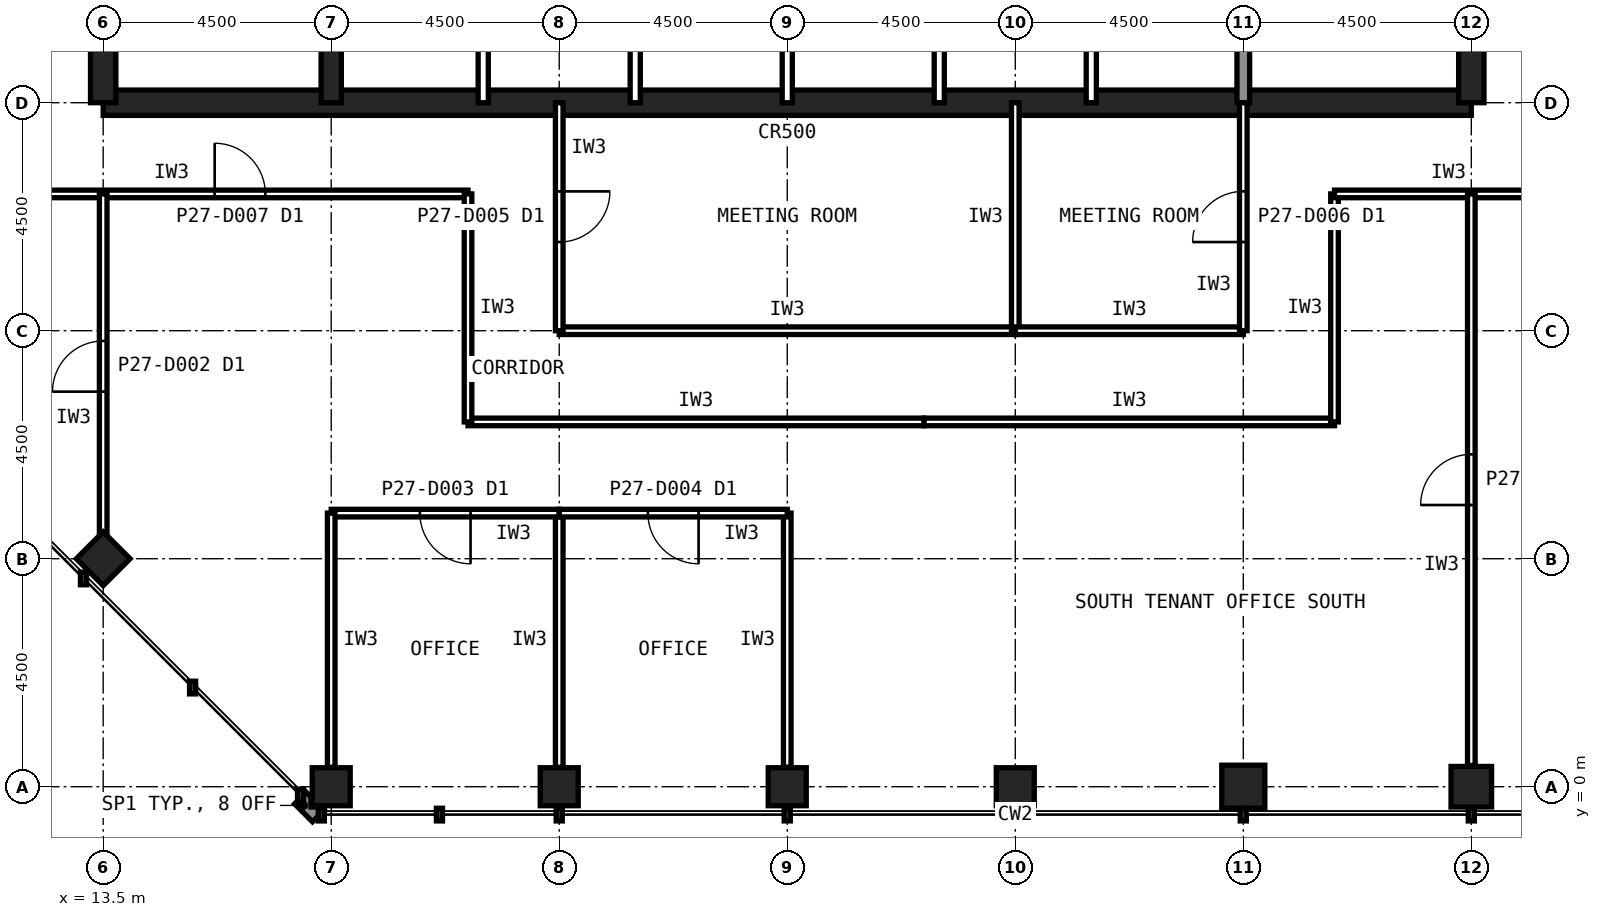
"""IFC4 building model, lengths in metres.
Left out: names, types, materials, properties, quantities, classifications, styles, units other than length and angle.
Written with IfcOpenShell. Run it as: python <this file> out.ifc"""

import sys

from ifc_helpers import new_model, si_unit, direction, frame, frame_2d, origin, origin_2d, place, context, subcontext, project, spatial, rectangle, hollow_rectangle, extrude, element, fill, save


model = new_model("IFC4")
c1 = context("Model", 3, precision=1e-05, world=origin(), true_north=direction((0.0, 1.0)))
c2 = subcontext(c1, "Body", "Model", "MODEL_VIEW")
j1 = project(units=[si_unit("LENGTHUNIT", "METRE"), si_unit("PLANEANGLEUNIT", "RADIAN")], contexts=[c1])
p1 = place(None, origin())
s1 = spatial("IfcSite", under=j1, at=p1, CompositionType="ELEMENT")
p2 = place(p1, origin())
s2 = spatial("IfcBuilding", under=s1, at=p2, CompositionType="ELEMENT")
p3 = place(p2, frame((0.0, 0.0, 119.6)))
s3 = spatial("IfcBuildingStorey", under=s2, at=p3, CompositionType="ELEMENT", Elevation=119.6)
for number, where, z_axis, x_axis in (
    (1, (18.0, 0.0, 0.0), (0.0, 0.0, 1.0), (1.0, 0.0, 0.0)),
    (2, (22.5, 0.0, 0.0), (0.0, 0.0, 1.0), (1.0, 0.0, 0.0)),
    (3, (27.0, 0.0, 0.0), (0.0, 0.0, 1.0), (1.0, 0.0, 0.0)),
    (4, (31.5, 0.0, 0.0), (0.0, 0.0, 1.0), (1.0, 0.0, 0.0)),
):
    element("IfcColumn", number, at=place(p3, frame(where, z_axis=z_axis, x_axis=x_axis)), inside=s3, PredefinedType="COLUMN", context=c2, shape_type="SweptSolid", body=[
        extrude(hollow_rectangle(XDim=0.75, YDim=0.75, WallThickness=0.04, at=origin_2d()), origin(), (0.0, 0.0, 1.0), 4.0),
    ])
p4 = place(p3, frame((36.0, 0.0, 0.0), z_axis=(0.0, 0.0, 1.0), x_axis=(1.0, 0.0, 0.0)))
e5 = element("IfcColumn", 5, at=p4, inside=s3, PredefinedType="COLUMN", context=c2, shape_type="SweptSolid", body=[
    extrude(hollow_rectangle(XDim=0.85, YDim=0.85, WallThickness=0.05, at=origin_2d()), origin(), (0.0, 0.0, 1.0), 4.0),
])
p5 = place(p3, frame((40.5, 0.0, 0.0), z_axis=(0.0, 0.0, 1.0), x_axis=(1.0, 0.0, 0.0)))
e6 = element("IfcColumn", 6, at=p5, inside=s3, PredefinedType="COLUMN", context=c2, shape_type="SweptSolid", body=[
    extrude(hollow_rectangle(XDim=0.8, YDim=0.8, WallThickness=0.045, at=origin_2d()), origin(), (0.0, 0.0, 1.0), 4.0),
])
p6 = place(p3, frame((13.5, 4.5, 0.0), z_axis=(0.0, 0.0, 1.0), x_axis=(0.707106781187, 0.707106781187, 0.0)))
e7 = element("IfcColumn", 7, at=p6, inside=s3, PredefinedType="COLUMN", context=c2, shape_type="SweptSolid", body=[
    extrude(hollow_rectangle(XDim=0.75, YDim=0.75, WallThickness=0.04, at=origin_2d()), origin(), (0.0, 0.0, 1.0), 4.0),
])
p7 = place(p3, frame((13.5, 13.5, 0.0), z_axis=(0.0, 0.0, 1.0), x_axis=(1.0, 0.0, 0.0)))
e8 = element("IfcWall", 8, at=p7, inside=s3, PredefinedType="SHEAR", context=c2, shape_type="SweptSolid", body=[
    extrude(rectangle(XDim=27.0, YDim=0.5, at=frame_2d((13.5, 0.0))), origin(), (0.0, 0.0, 1.0), 4.0),
])
p8 = place(p3, frame((40.5, 13.5, 0.0), z_axis=(0.0, 0.0, 1.0), x_axis=(0.0, 1.0, 0.0)))
e9 = element("IfcWall", 9, at=p8, inside=s3, PredefinedType="SHEAR", context=c2, shape_type="SweptSolid", body=[
    extrude(rectangle(XDim=27.0, YDim=0.5, at=frame_2d((13.5, 0.0))), origin(), (0.0, 0.0, 1.0), 4.0),
])
p9 = place(p8, frame((5.85, 0.0, 0.0)))
e10 = element("IfcOpeningElement", 10, at=p9, cuts=e9, PredefinedType="OPENING", context=c2, shape_type="SweptSolid", body=[
    extrude(rectangle(XDim=1.8, YDim=2.1, at=frame_2d((0.9, 1.05))), frame((0.0, 0.26, 0.0), z_axis=(0.0, -1.0, 0.0), x_axis=(1.0, 0.0, 0.0)), (0.0, 0.0, 1.0), 0.52),
])
p10 = place(p8, frame((19.65, 0.0, 0.0)))
e11 = element("IfcOpeningElement", 11, at=p10, cuts=e9, PredefinedType="OPENING", context=c2, shape_type="SweptSolid", body=[
    extrude(rectangle(XDim=1.2, YDim=2.1, at=frame_2d((0.6, 1.05))), frame((0.0, 0.26, 0.0), z_axis=(0.0, -1.0, 0.0), x_axis=(1.0, 0.0, 0.0)), (0.0, 0.0, 1.0), 0.52),
])
p11 = place(p3, frame((13.5, 40.5, 0.0), z_axis=(0.0, 0.0, 1.0), x_axis=(0.0, -1.0, 0.0)))
e12 = element("IfcWall", 12, at=p11, inside=s3, PredefinedType="SHEAR", context=c2, shape_type="SweptSolid", body=[
    extrude(rectangle(XDim=27.0, YDim=0.5, at=frame_2d((13.5, 0.0))), origin(), (0.0, 0.0, 1.0), 4.0),
])
p12 = place(p11, frame((19.65, 0.0, 0.0)))
e13 = element("IfcOpeningElement", 13, at=p12, cuts=e12, PredefinedType="OPENING", context=c2, shape_type="SweptSolid", body=[
    extrude(rectangle(XDim=1.2, YDim=2.1, at=frame_2d((0.6, 1.05))), frame((0.0, 0.26, 0.0), z_axis=(0.0, -1.0, 0.0), x_axis=(1.0, 0.0, 0.0)), (0.0, 0.0, 1.0), 0.52),
])
p13 = place(p11, frame((5.85, 0.0, 0.0)))
e14 = element("IfcOpeningElement", 14, at=p13, cuts=e12, PredefinedType="OPENING", context=c2, shape_type="SweptSolid", body=[
    extrude(rectangle(XDim=1.8, YDim=2.1, at=frame_2d((0.9, 1.05))), frame((0.0, 0.26, 0.0), z_axis=(0.0, -1.0, 0.0), x_axis=(1.0, 0.0, 0.0)), (0.0, 0.0, 1.0), 0.52),
])
p14 = place(p3, frame((18.0, 13.5, 0.0), z_axis=(0.0, 0.0, 1.0), x_axis=(0.0, 1.0, 0.0)))
e15 = element("IfcWall", 15, at=p14, inside=s3, PredefinedType="SHEAR", context=c2, shape_type="SweptSolid", body=[
    extrude(rectangle(XDim=18.0, YDim=0.4, at=frame_2d((9.0, 0.0))), origin(), (0.0, 0.0, 1.0), 4.0),
])
p15 = place(p3, frame((36.0, 13.5, 0.0), z_axis=(0.0, 0.0, 1.0), x_axis=(0.0, 1.0, 0.0)))
e16 = element("IfcWall", 16, at=p15, inside=s3, PredefinedType="SOLIDWALL", context=c2, shape_type="SweptSolid", body=[
    extrude(rectangle(XDim=4.5, YDim=0.25, at=frame_2d((2.25, 0.0))), origin(), (0.0, 0.0, 1.0), 3.84),
])
for number, where, z_axis, x_axis in (
    (17, (21.0, 13.5, 0.0), (0.0, 0.0, 1.0), (0.0, 1.0, 0.0)),
    (18, (24.0, 13.5, 0.0), (0.0, 0.0, 1.0), (0.0, 1.0, 0.0)),
    (19, (27.0, 13.5, 0.0), (0.0, 0.0, 1.0), (0.0, 1.0, 0.0)),
    (20, (30.0, 13.5, 0.0), (0.0, 0.0, 1.0), (0.0, 1.0, 0.0)),
    (21, (33.0, 13.5, 0.0), (0.0, 0.0, 1.0), (0.0, 1.0, 0.0)),
):
    element("IfcWall", number, at=place(p3, frame(where, z_axis=z_axis, x_axis=x_axis)), inside=s3, PredefinedType="PARTITIONING", context=c2, shape_type="SweptSolid", body=[
        extrude(rectangle(XDim=4.5, YDim=0.2, at=frame_2d((2.25, 0.0))), origin(), (0.0, 0.0, 1.0), 3.84),
    ])
p16 = place(p3, frame((11.7, 11.7, 0.0), z_axis=(0.0, 0.0, 1.0), x_axis=(1.0, 0.0, 0.0)))
e22 = element("IfcWall", 22, at=p16, inside=s3, PredefinedType="PARTITIONING", context=c2, shape_type="SweptSolid", body=[
    extrude(rectangle(XDim=9.0, YDim=0.15, at=frame_2d((4.5, 0.0))), origin(), (0.0, 0.0, 1.0), 3.84),
])
p17 = place(p16, frame((4.0, 0.0, 0.0)))
e23 = element("IfcOpeningElement", 23, at=p17, cuts=e22, PredefinedType="OPENING", context=c2, shape_type="SweptSolid", body=[
    extrude(rectangle(XDim=1.0, YDim=2.1, at=frame_2d((0.5, 1.05))), frame((0.0, 0.085, 0.0), z_axis=(0.0, -1.0, 0.0), x_axis=(1.0, 0.0, 0.0)), (0.0, 0.0, 1.0), 0.17),
])
p18 = place(p3, frame((20.7, 7.2, 0.0), z_axis=(0.0, 0.0, 1.0), x_axis=(1.0, 0.0, 0.0)))
e24 = element("IfcWall", 24, at=p18, inside=s3, PredefinedType="PARTITIONING", context=c2, shape_type="SweptSolid", body=[
    extrude(rectangle(XDim=9.0, YDim=0.15, at=frame_2d((4.5, 0.0))), origin(), (0.0, 0.0, 1.0), 3.84),
])
p19 = place(p3, frame((29.7, 7.2, 0.0), z_axis=(0.0, 0.0, 1.0), x_axis=(1.0, 0.0, 0.0)))
e25 = element("IfcWall", 25, at=p19, inside=s3, PredefinedType="PARTITIONING", context=c2, shape_type="SweptSolid", body=[
    extrude(rectangle(XDim=8.1, YDim=0.15, at=frame_2d((4.05, 0.0))), origin(), (0.0, 0.0, 1.0), 3.84),
])
for number, where, z_axis, x_axis in (
    (26, (20.7, 11.7, 0.0), (0.0, 0.0, 1.0), (0.0, -1.0, 0.0)),
    (27, (37.8, 7.2, 0.0), (0.0, 0.0, 1.0), (0.0, 1.0, 0.0)),
    (28, (37.8, 11.7, 0.0), (0.0, 0.0, 1.0), (1.0, 0.0, 0.0)),
):
    element("IfcWall", number, at=place(p3, frame(where, z_axis=z_axis, x_axis=x_axis)), inside=s3, PredefinedType="PARTITIONING", context=c2, shape_type="SweptSolid", body=[
        extrude(rectangle(XDim=4.5, YDim=0.15, at=frame_2d((2.25, 0.0))), origin(), (0.0, 0.0, 1.0), 3.84),
    ])
p20 = place(p3, frame((22.5, 9.0, 0.0), z_axis=(0.0, 0.0, 1.0), x_axis=(1.0, 0.0, 0.0)))
e29 = element("IfcWall", 29, at=p20, inside=s3, PredefinedType="PARTITIONING", context=c2, shape_type="SweptSolid", body=[
    extrude(rectangle(XDim=9.0, YDim=0.15, at=frame_2d((4.5, 0.0))), origin(), (0.0, 0.0, 1.0), 3.84),
])
p21 = place(p3, frame((31.5, 9.0, 0.0), z_axis=(0.0, 0.0, 1.0), x_axis=(0.0, 1.0, 0.0)))
e30 = element("IfcWall", 30, at=p21, inside=s3, PredefinedType="PARTITIONING", context=c2, shape_type="SweptSolid", body=[
    extrude(rectangle(XDim=4.5, YDim=0.15, at=frame_2d((2.25, 0.0))), origin(), (0.0, 0.0, 1.0), 2.989),
])
p22 = place(p3, frame((22.5, 13.5, 0.0), z_axis=(0.0, 0.0, 1.0), x_axis=(0.0, -1.0, 0.0)))
e31 = element("IfcWall", 31, at=p22, inside=s3, PredefinedType="PARTITIONING", context=c2, shape_type="SweptSolid", body=[
    extrude(rectangle(XDim=4.5, YDim=0.15, at=frame_2d((2.25, 0.0))), origin(), (0.0, 0.0, 1.0), 2.989),
])
p23 = place(p22, frame((1.75, 0.0, 0.0)))
e32 = element("IfcOpeningElement", 32, at=p23, cuts=e31, PredefinedType="OPENING", context=c2, shape_type="SweptSolid", body=[
    extrude(rectangle(XDim=1.0, YDim=2.1, at=frame_2d((0.5, 1.05))), frame((0.0, 0.085, 0.0), z_axis=(0.0, -1.0, 0.0), x_axis=(1.0, 0.0, 0.0)), (0.0, 0.0, 1.0), 0.17),
])
p24 = place(p3, frame((22.5, 0.385, 0.0), z_axis=(0.0, 0.0, 1.0), x_axis=(0.0, 1.0, 0.0)))
e33 = element("IfcWall", 33, at=p24, inside=s3, PredefinedType="PARTITIONING", context=c2, shape_type="SweptSolid", body=[
    extrude(rectangle(XDim=5.015, YDim=0.15, at=frame_2d((2.507, 0.0))), origin(), (0.0, 0.0, 1.0), 2.989),
])
p25 = place(p3, frame((22.5, 5.4, 0.0), z_axis=(0.0, 0.0, 1.0), x_axis=(-1.0, 0.0, 0.0)))
e34 = element("IfcWall", 34, at=p25, inside=s3, PredefinedType="PARTITIONING", context=c2, shape_type="SweptSolid", body=[
    extrude(rectangle(XDim=4.5, YDim=0.15, at=frame_2d((2.25, 0.0))), origin(), (0.0, 0.0, 1.0), 3.84),
])
p26 = place(p25, frame((1.75, 0.0, 0.0)))
e35 = element("IfcOpeningElement", 35, at=p26, cuts=e34, PredefinedType="OPENING", context=c2, shape_type="SweptSolid", body=[
    extrude(rectangle(XDim=1.0, YDim=2.1, at=frame_2d((0.5, 1.05))), frame((0.0, 0.085, 0.0), z_axis=(0.0, -1.0, 0.0), x_axis=(1.0, 0.0, 0.0)), (0.0, 0.0, 1.0), 0.17),
])
for number, where, z_axis, x_axis in (
    (36, (18.0, 5.4, 0.0), (0.0, 0.0, 1.0), (0.0, -1.0, 0.0)),
    (37, (27.0, 0.385, 0.0), (0.0, 0.0, 1.0), (0.0, 1.0, 0.0)),
):
    element("IfcWall", number, at=place(p3, frame(where, z_axis=z_axis, x_axis=x_axis)), inside=s3, PredefinedType="PARTITIONING", context=c2, shape_type="SweptSolid", body=[
        extrude(rectangle(XDim=5.015, YDim=0.15, at=frame_2d((2.507, 0.0))), origin(), (0.0, 0.0, 1.0), 2.989),
    ])
p27 = place(p3, frame((27.0, 5.4, 0.0), z_axis=(0.0, 0.0, 1.0), x_axis=(-1.0, 0.0, 0.0)))
e38 = element("IfcWall", 38, at=p27, inside=s3, PredefinedType="PARTITIONING", context=c2, shape_type="SweptSolid", body=[
    extrude(rectangle(XDim=4.5, YDim=0.15, at=frame_2d((2.25, 0.0))), origin(), (0.0, 0.0, 1.0), 3.84),
])
p28 = place(p27, frame((1.75, 0.0, 0.0)))
e39 = element("IfcOpeningElement", 39, at=p28, cuts=e38, PredefinedType="OPENING", context=c2, shape_type="SweptSolid", body=[
    extrude(rectangle(XDim=1.0, YDim=2.1, at=frame_2d((0.5, 1.05))), frame((0.0, 0.085, 0.0), z_axis=(0.0, -1.0, 0.0), x_axis=(1.0, 0.0, 0.0)), (0.0, 0.0, 1.0), 0.17),
])
p29 = place(p3, frame((31.5, 9.0, 0.0), z_axis=(0.0, 0.0, 1.0), x_axis=(1.0, 0.0, 0.0)))
e40 = element("IfcWall", 40, at=p29, inside=s3, PredefinedType="PARTITIONING", context=c2, shape_type="SweptSolid", body=[
    extrude(rectangle(XDim=4.5, YDim=0.15, at=frame_2d((2.25, 0.0))), origin(), (0.0, 0.0, 1.0), 3.84),
])
p30 = place(p3, frame((36.0, 9.0, 0.0), z_axis=(0.0, 0.0, 1.0), x_axis=(0.0, 1.0, 0.0)))
e41 = element("IfcWall", 41, at=p30, inside=s3, PredefinedType="PARTITIONING", context=c2, shape_type="SweptSolid", body=[
    extrude(rectangle(XDim=4.5, YDim=0.15, at=frame_2d((2.25, 0.0))), origin(), (0.0, 0.0, 1.0), 2.989),
])
p31 = place(p30, frame((1.75, 0.0, 0.0)))
e42 = element("IfcOpeningElement", 42, at=p31, cuts=e41, PredefinedType="OPENING", context=c2, shape_type="SweptSolid", body=[
    extrude(rectangle(XDim=1.0, YDim=2.1, at=frame_2d((0.5, 1.05))), frame((0.0, 0.085, 0.0), z_axis=(0.0, -1.0, 0.0), x_axis=(1.0, 0.0, 0.0)), (0.0, 0.0, 1.0), 0.17),
])
p32 = place(p3, frame((40.5, 0.42, 0.0), z_axis=(0.0, 0.0, 1.0), x_axis=(0.0, 1.0, 0.0)))
e43 = element("IfcWall", 43, at=p32, inside=s3, PredefinedType="PARTITIONING", context=c2, shape_type="SweptSolid", body=[
    extrude(rectangle(XDim=11.28, YDim=0.15, at=frame_2d((5.64, 0.0))), origin(), (0.0, 0.0, 1.0), 2.989),
])
p33 = place(p32, frame((5.14, 0.0, 0.0)))
e44 = element("IfcOpeningElement", 44, at=p33, cuts=e43, PredefinedType="OPENING", context=c2, shape_type="SweptSolid", body=[
    extrude(rectangle(XDim=1.0, YDim=2.1, at=frame_2d((0.5, 1.05))), frame((0.0, 0.085, 0.0), z_axis=(0.0, -1.0, 0.0), x_axis=(1.0, 0.0, 0.0)), (0.0, 0.0, 1.0), 0.17),
])
p34 = place(p3, frame((13.5, 4.895, 0.0), z_axis=(0.0, 0.0, 1.0), x_axis=(0.0, 1.0, 0.0)))
e45 = element("IfcWall", 45, at=p34, inside=s3, PredefinedType="PARTITIONING", context=c2, shape_type="SweptSolid", body=[
    extrude(rectangle(XDim=6.805, YDim=0.15, at=frame_2d((3.402, 0.0))), origin(), (0.0, 0.0, 1.0), 2.989),
])
p35 = place(p34, frame((2.903, 0.0, 0.0)))
e46 = element("IfcOpeningElement", 46, at=p35, cuts=e45, PredefinedType="OPENING", context=c2, shape_type="SweptSolid", body=[
    extrude(rectangle(XDim=1.0, YDim=2.1, at=frame_2d((0.5, 1.05))), frame((0.0, 0.085, 0.0), z_axis=(0.0, -1.0, 0.0), x_axis=(1.0, 0.0, 0.0)), (0.0, 0.0, 1.0), 0.17),
])
p36 = place(p17, origin())
e47 = element("IfcDoor", 47, at=p36, inside=s3, OperationType="SINGLE_SWING_LEFT", PredefinedType="DOOR", context=c2, shape_type="SweptSolid", body=[
    extrude(rectangle(XDim=1.0, YDim=2.1, at=frame_2d((0.5, 1.05))), frame((0.0, 0.025, 0.0), z_axis=(0.0, -1.0, 0.0), x_axis=(1.0, 0.0, 0.0)), (0.0, 0.0, 1.0), 0.05),
])
fill(e23, e47)
p37 = place(p23, origin())
e48 = element("IfcDoor", 48, at=p37, inside=s3, OperationType="SINGLE_SWING_LEFT", PredefinedType="DOOR", context=c2, shape_type="SweptSolid", body=[
    extrude(rectangle(XDim=1.0, YDim=2.1, at=frame_2d((0.5, 1.05))), frame((0.0, 0.025, 0.0), z_axis=(0.0, -1.0, 0.0), x_axis=(1.0, 0.0, 0.0)), (0.0, 0.0, 1.0), 0.05),
])
fill(e32, e48)
p38 = place(p26, origin())
e49 = element("IfcDoor", 49, at=p38, inside=s3, OperationType="SINGLE_SWING_LEFT", PredefinedType="DOOR", context=c2, shape_type="SweptSolid", body=[
    extrude(rectangle(XDim=1.0, YDim=2.1, at=frame_2d((0.5, 1.05))), frame((0.0, 0.025, 0.0), z_axis=(0.0, -1.0, 0.0), x_axis=(1.0, 0.0, 0.0)), (0.0, 0.0, 1.0), 0.05),
])
fill(e35, e49)
p39 = place(p28, origin())
e50 = element("IfcDoor", 50, at=p39, inside=s3, OperationType="SINGLE_SWING_LEFT", PredefinedType="DOOR", context=c2, shape_type="SweptSolid", body=[
    extrude(rectangle(XDim=1.0, YDim=2.1, at=frame_2d((0.5, 1.05))), frame((0.0, 0.025, 0.0), z_axis=(0.0, -1.0, 0.0), x_axis=(1.0, 0.0, 0.0)), (0.0, 0.0, 1.0), 0.05),
])
fill(e39, e50)
p40 = place(p31, origin())
e51 = element("IfcDoor", 51, at=p40, inside=s3, OperationType="SINGLE_SWING_LEFT", PredefinedType="DOOR", context=c2, shape_type="SweptSolid", body=[
    extrude(rectangle(XDim=1.0, YDim=2.1, at=frame_2d((0.5, 1.05))), frame((0.0, 0.025, 0.0), z_axis=(0.0, -1.0, 0.0), x_axis=(1.0, 0.0, 0.0)), (0.0, 0.0, 1.0), 0.05),
])
fill(e42, e51)
p41 = place(p33, origin())
e52 = element("IfcDoor", 52, at=p41, inside=s3, OperationType="SINGLE_SWING_LEFT", PredefinedType="DOOR", context=c2, shape_type="SweptSolid", body=[
    extrude(rectangle(XDim=1.0, YDim=2.1, at=frame_2d((0.5, 1.05))), frame((0.0, 0.025, 0.0), z_axis=(0.0, -1.0, 0.0), x_axis=(1.0, 0.0, 0.0)), (0.0, 0.0, 1.0), 0.05),
])
fill(e44, e52)
p42 = place(p35, origin())
e53 = element("IfcDoor", 53, at=p42, inside=s3, OperationType="SINGLE_SWING_LEFT", PredefinedType="DOOR", context=c2, shape_type="SweptSolid", body=[
    extrude(rectangle(XDim=1.0, YDim=2.1, at=frame_2d((0.5, 1.05))), frame((0.0, 0.025, 0.0), z_axis=(0.0, -1.0, 0.0), x_axis=(1.0, 0.0, 0.0)), (0.0, 0.0, 1.0), 0.05),
])
fill(e46, e53)
save(model, sys.argv[1])
